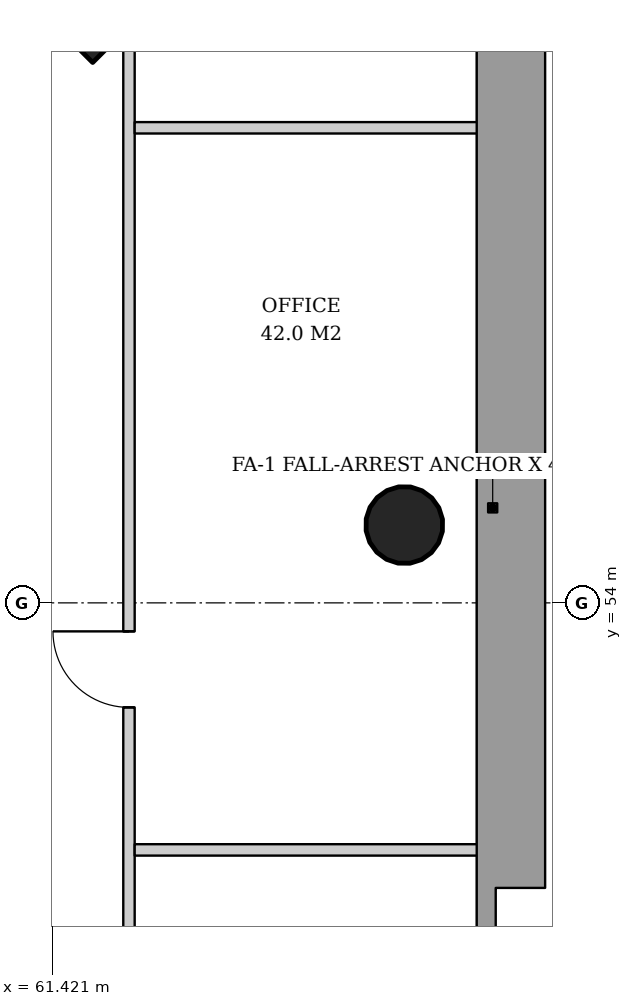
"""IFC4 building model, lengths in metres.
Left out: names, types, materials, properties, quantities, classifications, styles, units other than length and angle.
Written with IfcOpenShell. Run it as: python <this file> out.ifc"""

import sys

from ifc_helpers import new_model, si_unit, direction, frame, frame_2d, origin, origin_2d, place, context, subcontext, project, spatial, rectangle, hollow_circle, extrude, element, fill, save


model = new_model("IFC4")
c1 = context("Model", 3, precision=1e-05, world=origin(), true_north=direction((0.0, 1.0)))
c2 = subcontext(c1, "Body", "Model", "MODEL_VIEW")
j1 = project(units=[si_unit("LENGTHUNIT", "METRE"), si_unit("PLANEANGLEUNIT", "RADIAN")], contexts=[c1])
p1 = place(None, origin())
s1 = spatial("IfcSite", under=j1, at=p1, CompositionType="ELEMENT")
p2 = place(p1, origin())
s2 = spatial("IfcBuilding", under=s1, at=p2, CompositionType="ELEMENT")
p3 = place(p2, frame((0.0, 0.0, 112.2)))
s3 = spatial("IfcBuildingStorey", under=s2, at=p3, CompositionType="ELEMENT", Elevation=112.2)
p4 = place(p3, frame((61.986, 62.986, 0.0), z_axis=(-0.031898107953, -0.031898107953, 0.998981992539), x_axis=(0.707106781187, -0.707106781187, 0.0)))
e1 = element("IfcColumn", 1, at=p4, inside=s3, PredefinedType="COLUMN", context=c2, shape_type="SweptSolid", body=[
    extrude(rectangle(XDim=2.6, YDim=2.6, at=origin_2d()), origin(), (0.0, 0.0, 1.0), 3.804),
])
p5 = place(p3, frame((66.086, 55.043, 0.0), z_axis=(-0.031910269556, -0.015987237665, 0.999362868496), x_axis=(0.447933021895, -0.894067115991, 0.0)))
e2 = element("IfcColumn", 2, at=p5, inside=s3, PredefinedType="COLUMN", context=c2, shape_type="SweptSolid", body=[
    extrude(hollow_circle(Radius=0.508, WallThickness=0.04, at=origin_2d()), origin(), (0.0, 0.0, 1.0), 3.802),
])
p6 = place(p3, frame((62.425, 30.489, 0.0), z_axis=(0.0, 0.0, 1.0), x_axis=(0.0, 1.0, 0.0)))
e3 = element("IfcWall", 3, at=p6, inside=s3, PredefinedType="PARTITIONING", context=c2, shape_type="SweptSolid", body=[
    extrude(rectangle(XDim=31.023, YDim=0.15, at=frame_2d((15.511, 0.0))), origin(), (0.0, 0.0, 1.0), 2.72),
])
p7 = place(p6, frame((3.136, 0.0, 0.0)))
e4 = element("IfcOpeningElement", 4, at=p7, cuts=e3, PredefinedType="OPENING", context=c2, shape_type="SweptSolid", body=[
    extrude(rectangle(XDim=1.0, YDim=2.1, at=frame_2d((0.5, 1.05))), frame((0.0, 0.085, 0.0), z_axis=(0.0, -1.0, 0.0), x_axis=(1.0, 0.0, 0.0)), (0.0, 0.0, 1.0), 0.17),
])
p8 = place(p6, frame((7.886, 0.0, 0.0)))
e5 = element("IfcOpeningElement", 5, at=p8, cuts=e3, PredefinedType="OPENING", context=c2, shape_type="SweptSolid", body=[
    extrude(rectangle(XDim=1.0, YDim=2.1, at=frame_2d((0.5, 1.05))), frame((0.0, 0.085, 0.0), z_axis=(0.0, -1.0, 0.0), x_axis=(1.0, 0.0, 0.0)), (0.0, 0.0, 1.0), 0.17),
])
p9 = place(p6, frame((12.636, 0.0, 0.0)))
e6 = element("IfcOpeningElement", 6, at=p9, cuts=e3, PredefinedType="OPENING", context=c2, shape_type="SweptSolid", body=[
    extrude(rectangle(XDim=1.0, YDim=2.1, at=frame_2d((0.5, 1.05))), frame((0.0, 0.085, 0.0), z_axis=(0.0, -1.0, 0.0), x_axis=(1.0, 0.0, 0.0)), (0.0, 0.0, 1.0), 0.17),
])
p10 = place(p6, frame((17.386, 0.0, 0.0)))
e7 = element("IfcOpeningElement", 7, at=p10, cuts=e3, PredefinedType="OPENING", context=c2, shape_type="SweptSolid", body=[
    extrude(rectangle(XDim=1.0, YDim=2.1, at=frame_2d((0.5, 1.05))), frame((0.0, 0.085, 0.0), z_axis=(0.0, -1.0, 0.0), x_axis=(1.0, 0.0, 0.0)), (0.0, 0.0, 1.0), 0.17),
])
p11 = place(p6, frame((22.136, 0.0, 0.0)))
e8 = element("IfcOpeningElement", 8, at=p11, cuts=e3, PredefinedType="OPENING", context=c2, shape_type="SweptSolid", body=[
    extrude(rectangle(XDim=1.0, YDim=2.1, at=frame_2d((0.5, 1.05))), frame((0.0, 0.085, 0.0), z_axis=(0.0, -1.0, 0.0), x_axis=(1.0, 0.0, 0.0)), (0.0, 0.0, 1.0), 0.17),
])
for number, where, z_axis, x_axis in (
    (9, (62.5, 50.75, 0.0), (0.0, 0.0, 1.0), (1.0, 0.0, 0.0)),
    (10, (62.5, 60.25, 0.0), (0.0, 0.0, 1.0), (1.0, 0.0, 0.0)),
):
    element("IfcWall", number, at=place(p3, frame(where, z_axis=z_axis, x_axis=x_axis)), inside=s3, PredefinedType="PARTITIONING", context=c2, shape_type="SweptSolid", body=[
        extrude(rectangle(XDim=4.54, YDim=0.15, at=frame_2d((2.27, 0.0))), origin(), (0.0, 0.0, 1.0), 2.82),
    ])
p12 = place(p11, origin())
e11 = element("IfcDoor", 11, at=p12, inside=s3, OperationType="SINGLE_SWING_RIGHT", PredefinedType="DOOR", context=c2, shape_type="SweptSolid", body=[
    extrude(rectangle(XDim=1.0, YDim=2.1, at=frame_2d((0.5, 1.05))), frame((0.0, 0.025, 0.0), z_axis=(0.0, -1.0, 0.0), x_axis=(1.0, 0.0, 0.0)), (0.0, 0.0, 1.0), 0.05),
])
fill(e8, e11)
save(model, sys.argv[1])
